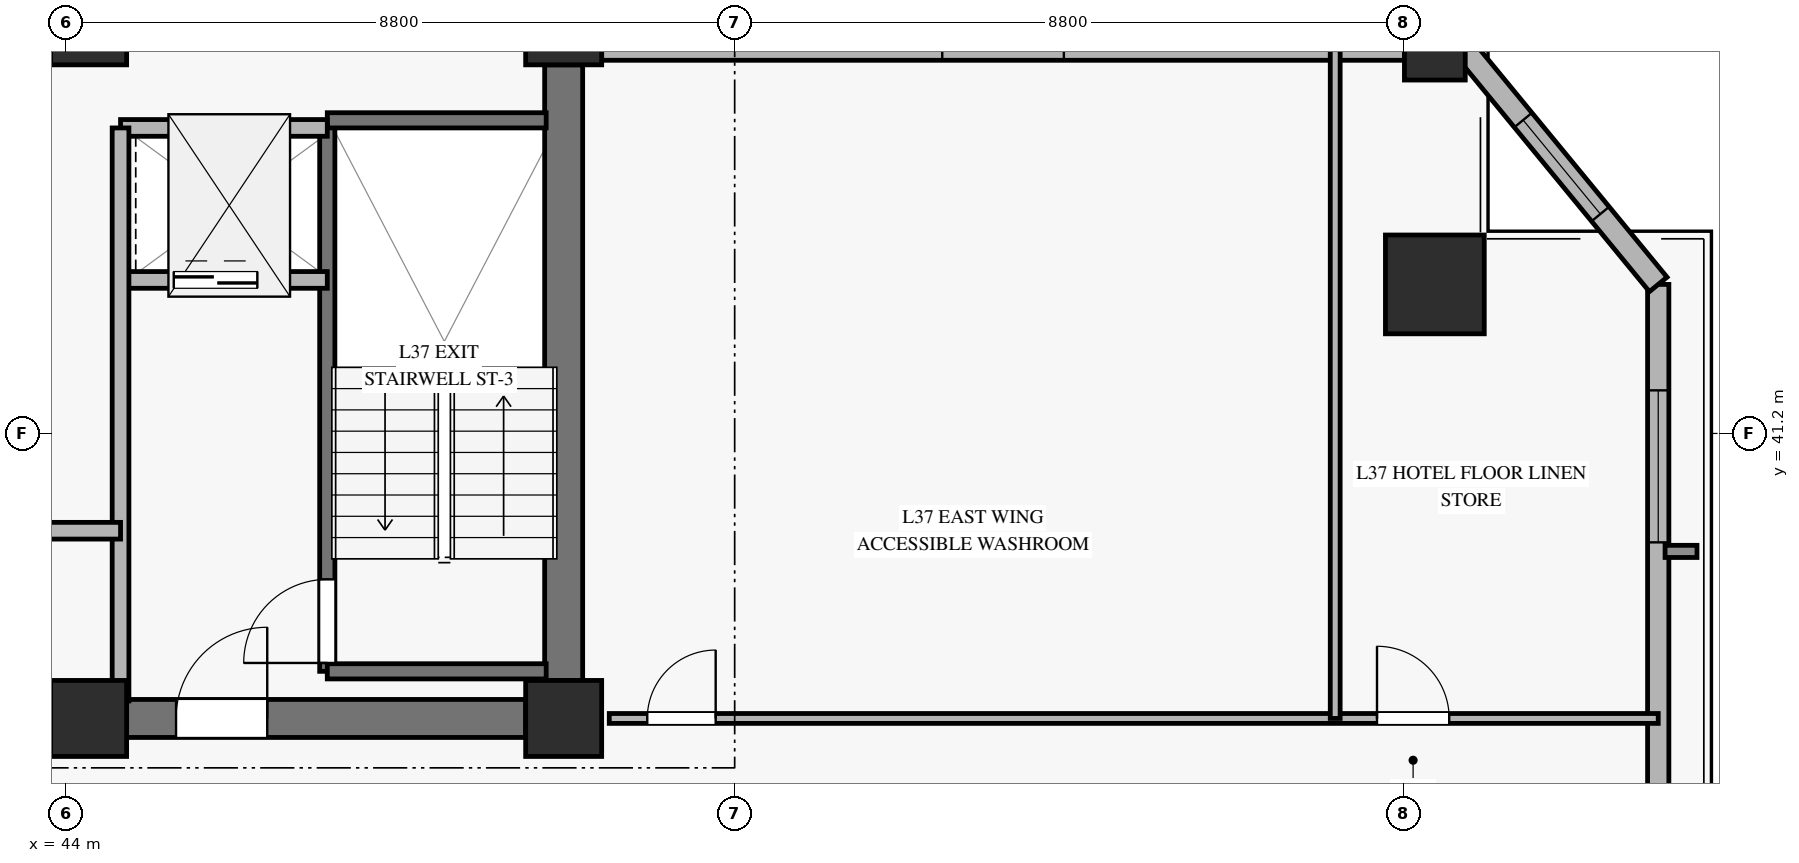
"""IFC4 building model, lengths in metres.
Left out: names, types, materials, properties, quantities, classifications, styles, units other than length and angle.
Written with IfcOpenShell. Run it as: python <this file> out.ifc"""

import sys

from ifc_helpers import new_model, si_unit, direction, frame, frame_2d, origin, origin_2d, place, context, subcontext, project, spatial, rectangle, hollow_rectangle, extrude, source, transform, mapped, element, fill, save


model = new_model("IFC4")
c1 = context("Model", 3, precision=1e-05, world=origin(), true_north=direction((0.0, 1.0)))
c2 = subcontext(c1, "Body", "Model", "MODEL_VIEW")
j1 = project(units=[si_unit("LENGTHUNIT", "METRE"), si_unit("PLANEANGLEUNIT", "RADIAN")], contexts=[c1])
p1 = place(None, origin())
s1 = spatial("IfcSite", under=j1, at=p1, CompositionType="ELEMENT")
p2 = place(p1, origin())
s2 = spatial("IfcBuilding", under=s1, at=p2, CompositionType="ELEMENT")
p3 = place(p2, frame((0.0, 0.0, 152.7)))
s3 = spatial("IfcBuildingStorey", under=s2, at=p3, CompositionType="ELEMENT", Elevation=152.7)
m1 = source(origin(), c2, "Body", "SweptSolid", [
    extrude(rectangle(XDim=1.0, YDim=1.0, at=origin_2d()), origin(), (0.0, 0.0, 1.0), 3.27),
])
for number, where, z_axis, x_axis in (
    (1, (44.3, 37.45, 0.0), (0.0, 0.0, 1.0), (1.0, 0.0, 0.0)),
    (2, (44.3, 46.55, 0.0), (0.0, 0.0, 1.0), (1.0, 0.0, 0.0)),
    (3, (50.55, 37.45, 0.0), (0.0, 0.0, 1.0), (1.0, 0.0, 0.0)),
    (4, (50.55, 46.55, 0.0), (0.0, 0.0, 1.0), (1.0, 0.0, 0.0)),
):
    element("IfcColumn", number, at=place(p3, frame(where, z_axis=z_axis, x_axis=x_axis)), inside=s3, PredefinedType="PILASTER", context=c2, shape_type="MappedRepresentation", body=[
        mapped(m1, transform((0.0, 0.0, 0.0), x_axis=(1.0, 0.0, 0.0), y_axis=(0.0, 1.0, 0.0), z_axis=(0.0, 0.0, 1.0), scale=1.0)),
    ])
p4 = place(p3, frame((44.8, 37.45, 0.0), z_axis=(0.0, 0.0, 1.0), x_axis=(1.0, 0.0, 0.0)))
e5 = element("IfcWall", 5, at=p4, inside=s3, PredefinedType="SHEAR", context=c2, shape_type="SweptSolid", body=[
    extrude(rectangle(XDim=5.25, YDim=0.5, at=frame_2d((2.625, 0.0))), origin(), (0.0, 0.0, 1.0), 3.27),
])
p5 = place(p4, frame((0.65, 0.0, 0.0)))
e6 = element("IfcOpeningElement", 6, at=p5, cuts=e5, PredefinedType="OPENING", context=c2, shape_type="SweptSolid", body=[
    extrude(rectangle(XDim=1.2, YDim=2.15, at=frame_2d((0.6, 1.075))), frame((0.0, 0.26, 0.0), z_axis=(0.0, -1.0, 0.0), x_axis=(1.0, 0.0, 0.0)), (0.0, 0.0, 1.0), 0.52),
])
p6 = place(p3, frame((50.55, 37.95, 0.0), z_axis=(0.0, 0.0, 1.0), x_axis=(0.0, 1.0, 0.0)))
e7 = element("IfcWall", 7, at=p6, inside=s3, PredefinedType="SHEAR", context=c2, shape_type="SweptSolid", body=[
    extrude(rectangle(XDim=8.1, YDim=0.5, at=frame_2d((4.05, 0.0))), origin(), (0.0, 0.0, 1.0), 3.27),
])
m2 = source(origin(), c2, "Body", "SweptSolid", [
    extrude(hollow_rectangle(XDim=1.3, YDim=1.3, WallThickness=0.06, at=origin_2d()), origin(), (0.0, 0.0, 1.0), 3.27),
])
p7 = place(p3, frame((62.012, 43.161, 0.0), z_axis=(0.0, 0.0, 1.0), x_axis=(1.0, 0.0, 0.0)))
e8 = element("IfcColumn", 8, at=p7, inside=s3, PredefinedType="COLUMN", context=c2, shape_type="MappedRepresentation", body=[
    mapped(m2, transform((0.0, 0.0, 0.0), x_axis=(1.0, 0.0, 0.0), y_axis=(0.0, 1.0, 0.0), z_axis=(0.0, 0.0, 1.0), scale=1.0)),
])
m3 = source(origin(), c2, "Body", "SweptSolid", [
    extrude(hollow_rectangle(XDim=0.8, YDim=0.8, WallThickness=0.036, at=origin_2d()), origin(), (0.0, 0.0, 1.0), 3.27),
])
p8 = place(p3, frame((62.012, 46.25, 0.0), z_axis=(0.0, 0.0, 1.0), x_axis=(1.0, 0.0, 0.0)))
e9 = element("IfcColumn", 9, at=p8, inside=s3, PredefinedType="COLUMN", context=c2, shape_type="MappedRepresentation", body=[
    mapped(m3, transform((0.0, 0.0, 0.0), x_axis=(1.0, 0.0, 0.0), y_axis=(0.0, 1.0, 0.0), z_axis=(0.0, 0.0, 1.0), scale=1.0)),
])
p9 = place(p3, frame((64.951, 27.736, 0.0), z_axis=(0.0, 0.0, 1.0), x_axis=(0.0, 1.0, 0.0)))
e10 = element("IfcWall", 10, at=p9, inside=s3, PredefinedType="SOLIDWALL", context=c2, shape_type="SweptSolid", body=[
    extrude(rectangle(XDim=15.425, YDim=0.28, at=frame_2d((7.712, 0.0))), origin(), (0.0, 0.0, 1.0), 2.75),
])
p10 = place(p9, frame((1.325, 0.0, 0.45)))
e11 = element("IfcOpeningElement", 11, at=p10, cuts=e10, PredefinedType="OPENING", context=c2, shape_type="SweptSolid", body=[
    extrude(rectangle(XDim=2.0, YDim=2.0, at=frame_2d((1.0, 1.0))), frame((0.0, 0.15, 0.0), z_axis=(0.0, -1.0, 0.0), x_axis=(1.0, 0.0, 0.0)), (0.0, 0.0, 1.0), 0.3),
])
p11 = place(p9, frame((12.031, 0.0, 0.45)))
e12 = element("IfcOpeningElement", 12, at=p11, cuts=e10, PredefinedType="OPENING", context=c2, shape_type="SweptSolid", body=[
    extrude(rectangle(XDim=2.0, YDim=2.0, at=frame_2d((1.0, 1.0))), frame((0.0, 0.15, 0.0), z_axis=(0.0, -1.0, 0.0), x_axis=(1.0, 0.0, 0.0)), (0.0, 0.0, 1.0), 0.3),
])
p12 = place(p3, frame((51.05, 46.25, 0.0), z_axis=(0.0, 0.0, 1.0), x_axis=(1.0, 0.0, 0.0)))
e13 = element("IfcWall", 13, at=p12, inside=s3, PredefinedType="SOLIDWALL", context=c2, shape_type="SweptSolid", body=[
    extrude(rectangle(XDim=10.562, YDim=0.28, at=frame_2d((5.281, 0.0))), origin(), (0.0, 0.0, 1.0), 2.75),
])
p13 = place(p12, frame((4.481, 0.0, 0.45)))
e14 = element("IfcOpeningElement", 14, at=p13, cuts=e13, PredefinedType="OPENING", context=c2, shape_type="SweptSolid", body=[
    extrude(rectangle(XDim=1.6, YDim=2.0, at=frame_2d((0.8, 1.0))), frame((0.0, 0.15, 0.0), z_axis=(0.0, -1.0, 0.0), x_axis=(1.0, 0.0, 0.0)), (0.0, 0.0, 1.0), 0.3),
])
p14 = place(p3, frame((64.951, 43.161, 0.0), z_axis=(0.0, 0.0, 1.0), x_axis=(-0.63493861858, 0.772562586873, 0.0)))
e15 = element("IfcWall", 15, at=p14, inside=s3, PredefinedType="SOLIDWALL", context=c2, shape_type="SweptSolid", body=[
    extrude(rectangle(XDim=3.999, YDim=0.3, at=frame_2d((1.999, 0.0))), origin(), (0.0, 0.0, 1.0), 2.75),
])
p15 = place(p14, frame((1.199, 0.0, 0.45)))
e16 = element("IfcOpeningElement", 16, at=p15, cuts=e15, PredefinedType="OPENING", context=c2, shape_type="SweptSolid", body=[
    extrude(rectangle(XDim=1.6, YDim=2.0, at=frame_2d((0.8, 1.0))), frame((0.0, 0.16, 0.0), z_axis=(0.0, -1.0, 0.0), x_axis=(1.0, 0.0, 0.0)), (0.0, 0.0, 1.0), 0.32),
])
p16 = place(p3, frame((47.44, 38.07, 0.0), z_axis=(0.0, 0.0, 1.0), x_axis=(0.0, 1.0, 0.0)))
e17 = element("IfcWall", 17, at=p16, inside=s3, PredefinedType="SOLIDWALL", context=c2, shape_type="SweptSolid", body=[
    extrude(rectangle(XDim=7.25, YDim=0.2, at=frame_2d((3.625, 0.0))), origin(), (0.0, 0.0, 1.0), 3.5),
])
p17 = place(p16, frame((0.11, 0.0, 0.0)))
e18 = element("IfcOpeningElement", 18, at=p17, cuts=e17, PredefinedType="OPENING", context=c2, shape_type="SweptSolid", body=[
    extrude(rectangle(XDim=1.1, YDim=2.15, at=frame_2d((0.55, 1.075))), frame((0.0, 0.11, 0.0), z_axis=(0.0, -1.0, 0.0), x_axis=(1.0, 0.0, 0.0)), (0.0, 0.0, 1.0), 0.22),
])
for number, where, z_axis, x_axis in (
    (19, (47.44, 45.32, 0.0), (0.0, 0.0, 1.0), (1.0, 0.0, 0.0)),
    (20, (47.44, 38.07, 0.0), (0.0, 0.0, 1.0), (1.0, 0.0, 0.0)),
):
    element("IfcWall", number, at=place(p3, frame(where, z_axis=z_axis, x_axis=x_axis)), inside=s3, PredefinedType="SOLIDWALL", context=c2, shape_type="SweptSolid", body=[
        extrude(rectangle(XDim=2.88, YDim=0.2, at=frame_2d((1.44, 0.0))), origin(), (0.0, 0.0, 1.0), 3.5),
    ])
p18 = place(p3, frame((44.72, 43.22, 0.0), z_axis=(0.0, 0.0, 1.0), x_axis=(1.0, 0.0, 0.0)))
e21 = element("IfcWall", 21, at=p18, inside=s3, PredefinedType="SOLIDWALL", context=c2, shape_type="SweptSolid", body=[
    extrude(rectangle(XDim=2.72, YDim=0.22, at=frame_2d((1.36, 0.0))), origin(), (0.0, 0.0, 1.0), 3.27),
])
p19 = place(p18, frame((0.7, 0.0, 0.0)))
e22 = element("IfcOpeningElement", 22, at=p19, cuts=e21, PredefinedType="OPENING", context=c2, shape_type="SweptSolid", body=[
    extrude(rectangle(XDim=1.1, YDim=2.2, at=frame_2d((0.55, 1.1))), frame((0.0, 0.12, 0.0), z_axis=(0.0, -1.0, 0.0), x_axis=(1.0, 0.0, 0.0)), (0.0, 0.0, 1.0), 0.24),
])
p20 = place(p3, frame((44.72, 45.22, 0.0), z_axis=(0.0, 0.0, 1.0), x_axis=(1.0, 0.0, 0.0)))
e23 = element("IfcWall", 23, at=p20, inside=s3, PredefinedType="SOLIDWALL", context=c2, shape_type="SweptSolid", body=[
    extrude(rectangle(XDim=2.72, YDim=0.22, at=frame_2d((1.36, 0.0))), origin(), (0.0, 0.0, 1.0), 3.27),
])
p21 = place(p3, frame((44.72, 37.68, 0.0), z_axis=(0.0, 0.0, 1.0), x_axis=(0.0, 1.0, 0.0)))
e24 = element("IfcWall", 24, at=p21, inside=s3, PredefinedType="SOLIDWALL", context=c2, shape_type="SweptSolid", body=[
    extrude(rectangle(XDim=7.54, YDim=0.22, at=frame_2d((3.77, 0.0))), origin(), (0.0, 0.0, 1.0), 3.27),
])
p22 = place(p3, frame((36.12, 39.92, 0.0), z_axis=(0.0, 0.0, 1.0), x_axis=(1.0, 0.0, 0.0)))
e25 = element("IfcWall", 25, at=p22, inside=s3, PredefinedType="SOLIDWALL", context=c2, shape_type="SweptSolid", body=[
    extrude(rectangle(XDim=8.6, YDim=0.22, at=frame_2d((4.3, 0.0))), origin(), (0.0, 0.0, 1.0), 2.555),
])
p23 = place(p3, frame((51.15, 37.45, 0.0), z_axis=(0.0, 0.0, 1.0), x_axis=(1.0, 0.0, 0.0)))
e26 = element("IfcWall", 26, at=p23, inside=s3, PredefinedType="PARTITIONING", context=c2, shape_type="SweptSolid", body=[
    extrude(rectangle(XDim=13.801, YDim=0.13, at=frame_2d((6.9, 0.0))), origin(), (0.0, 0.0, 1.0), 2.755),
])
p24 = place(p23, frame((0.5, 0.0, 0.0)))
e27 = element("IfcOpeningElement", 27, at=p24, cuts=e26, PredefinedType="OPENING", context=c2, shape_type="SweptSolid", body=[
    extrude(rectangle(XDim=0.9, YDim=2.1, at=frame_2d((0.45, 1.05))), frame((0.0, 0.075, 0.0), z_axis=(0.0, -1.0, 0.0), x_axis=(1.0, 0.0, 0.0)), (0.0, 0.0, 1.0), 0.15),
])
p25 = place(p23, frame((10.101, 0.0, 0.0)))
e28 = element("IfcOpeningElement", 28, at=p25, cuts=e26, PredefinedType="OPENING", context=c2, shape_type="SweptSolid", body=[
    extrude(rectangle(XDim=0.95, YDim=2.1, at=frame_2d((0.475, 1.05))), frame((0.0, 0.075, 0.0), z_axis=(0.0, -1.0, 0.0), x_axis=(1.0, 0.0, 0.0)), (0.0, 0.0, 1.0), 0.15),
])
p26 = place(p3, frame((60.701, 37.45, 0.0), z_axis=(0.0, 0.0, 1.0), x_axis=(0.0, 1.0, 0.0)))
e29 = element("IfcWall", 29, at=p26, inside=s3, PredefinedType="PARTITIONING", context=c2, shape_type="SweptSolid", body=[
    extrude(rectangle(XDim=8.8, YDim=0.13, at=frame_2d((4.4, 0.0))), origin(), (0.0, 0.0, 1.0), 3.27),
])
m4 = source(origin(), c2, "Body", "SweptSolid", [
    extrude(rectangle(XDim=2.0, YDim=2.0, at=frame_2d((1.0, 1.0))), frame((0.0, 0.03, 0.0), z_axis=(0.0, -1.0, 0.0), x_axis=(1.0, 0.0, 0.0)), (0.0, 0.0, 1.0), 0.06),
])
p27 = place(p11, origin())
e30 = element("IfcWindow", 30, at=p27, inside=s3, PartitioningType="SINGLE_PANEL", PredefinedType="WINDOW", context=c2, shape_type="MappedRepresentation", body=[
    mapped(m4, transform((0.0, 0.0, 0.0), x_axis=(1.0, 0.0, 0.0), y_axis=(0.0, 1.0, 0.0), z_axis=(0.0, 0.0, 1.0), scale=1.0)),
])
fill(e12, e30)
m5 = source(origin(), c2, "Body", "SweptSolid", [
    extrude(rectangle(XDim=1.6, YDim=2.0, at=frame_2d((0.8, 1.0))), frame((0.0, 0.03, 0.0), z_axis=(0.0, -1.0, 0.0), x_axis=(1.0, 0.0, 0.0)), (0.0, 0.0, 1.0), 0.06),
])
p28 = place(p15, origin())
e31 = element("IfcWindow", 31, at=p28, inside=s3, PartitioningType="SINGLE_PANEL", PredefinedType="WINDOW", context=c2, shape_type="MappedRepresentation", body=[
    mapped(m5, transform((0.0, 0.0, 0.0), x_axis=(1.0, 0.0, 0.0), y_axis=(0.0, 1.0, 0.0), z_axis=(0.0, 0.0, 1.0), scale=1.0)),
])
fill(e16, e31)
m6 = source(origin(), c2, "Body", "SweptSolid", [
    extrude(rectangle(XDim=1.1, YDim=2.15, at=frame_2d((0.55, 1.075))), frame((0.0, 0.025, 0.0), z_axis=(0.0, -1.0, 0.0), x_axis=(1.0, 0.0, 0.0)), (0.0, 0.0, 1.0), 0.05),
])
p29 = place(p17, origin())
e32 = element("IfcDoor", 32, at=p29, inside=s3, OperationType="SINGLE_SWING_LEFT", PredefinedType="DOOR", context=c2, shape_type="MappedRepresentation", body=[
    mapped(m6, transform((0.0, 0.0, 0.0), x_axis=(1.0, 0.0, 0.0), y_axis=(0.0, 1.0, 0.0), z_axis=(0.0, 0.0, 1.0), scale=1.0)),
])
fill(e18, e32)
m7 = source(origin(), c2, "Body", "SweptSolid", [
    extrude(rectangle(XDim=1.1, YDim=2.2, at=frame_2d((0.55, 1.1))), frame((0.0, 0.025, 0.0), z_axis=(0.0, -1.0, 0.0), x_axis=(1.0, 0.0, 0.0)), (0.0, 0.0, 1.0), 0.05),
])
p30 = place(p19, origin())
e33 = element("IfcDoor", 33, at=p30, inside=s3, OperationType="SLIDING_TO_LEFT", PredefinedType="DOOR", context=c2, shape_type="MappedRepresentation", body=[
    mapped(m7, transform((0.0, 0.0, 0.0), x_axis=(1.0, 0.0, 0.0), y_axis=(0.0, 1.0, 0.0), z_axis=(0.0, 0.0, 1.0), scale=1.0)),
])
fill(e22, e33)
m8 = source(origin(), c2, "Body", "SweptSolid", [
    extrude(rectangle(XDim=1.2, YDim=2.15, at=frame_2d((0.6, 1.075))), frame((0.0, 0.025, 0.0), z_axis=(0.0, -1.0, 0.0), x_axis=(1.0, 0.0, 0.0)), (0.0, 0.0, 1.0), 0.05),
])
p31 = place(p5, origin())
e34 = element("IfcDoor", 34, at=p31, inside=s3, OperationType="SINGLE_SWING_RIGHT", PredefinedType="DOOR", context=c2, shape_type="MappedRepresentation", body=[
    mapped(m8, transform((0.0, 0.0, 0.0), x_axis=(1.0, 0.0, 0.0), y_axis=(0.0, 1.0, 0.0), z_axis=(0.0, 0.0, 1.0), scale=1.0)),
])
fill(e6, e34)
m9 = source(origin(), c2, "Body", "SweptSolid", [
    extrude(rectangle(XDim=0.9, YDim=2.1, at=frame_2d((0.45, 1.05))), frame((0.0, 0.025, 0.0), z_axis=(0.0, -1.0, 0.0), x_axis=(1.0, 0.0, 0.0)), (0.0, 0.0, 1.0), 0.05),
])
p32 = place(p24, origin())
e35 = element("IfcDoor", 35, at=p32, inside=s3, OperationType="SINGLE_SWING_RIGHT", PredefinedType="DOOR", context=c2, shape_type="MappedRepresentation", body=[
    mapped(m9, transform((0.0, 0.0, 0.0), x_axis=(1.0, 0.0, 0.0), y_axis=(0.0, 1.0, 0.0), z_axis=(0.0, 0.0, 1.0), scale=1.0)),
])
fill(e27, e35)
m10 = source(origin(), c2, "Body", "SweptSolid", [
    extrude(rectangle(XDim=0.95, YDim=2.1, at=frame_2d((0.475, 1.05))), frame((0.0, 0.025, 0.0), z_axis=(0.0, -1.0, 0.0), x_axis=(1.0, 0.0, 0.0)), (0.0, 0.0, 1.0), 0.05),
])
p33 = place(p25, origin())
e36 = element("IfcDoor", 36, at=p33, inside=s3, OperationType="SINGLE_SWING_LEFT", PredefinedType="DOOR", context=c2, shape_type="MappedRepresentation", body=[
    mapped(m10, transform((0.0, 0.0, 0.0), x_axis=(1.0, 0.0, 0.0), y_axis=(0.0, 1.0, 0.0), z_axis=(0.0, 0.0, 1.0), scale=1.0)),
])
fill(e28, e36)
save(model, sys.argv[1])
